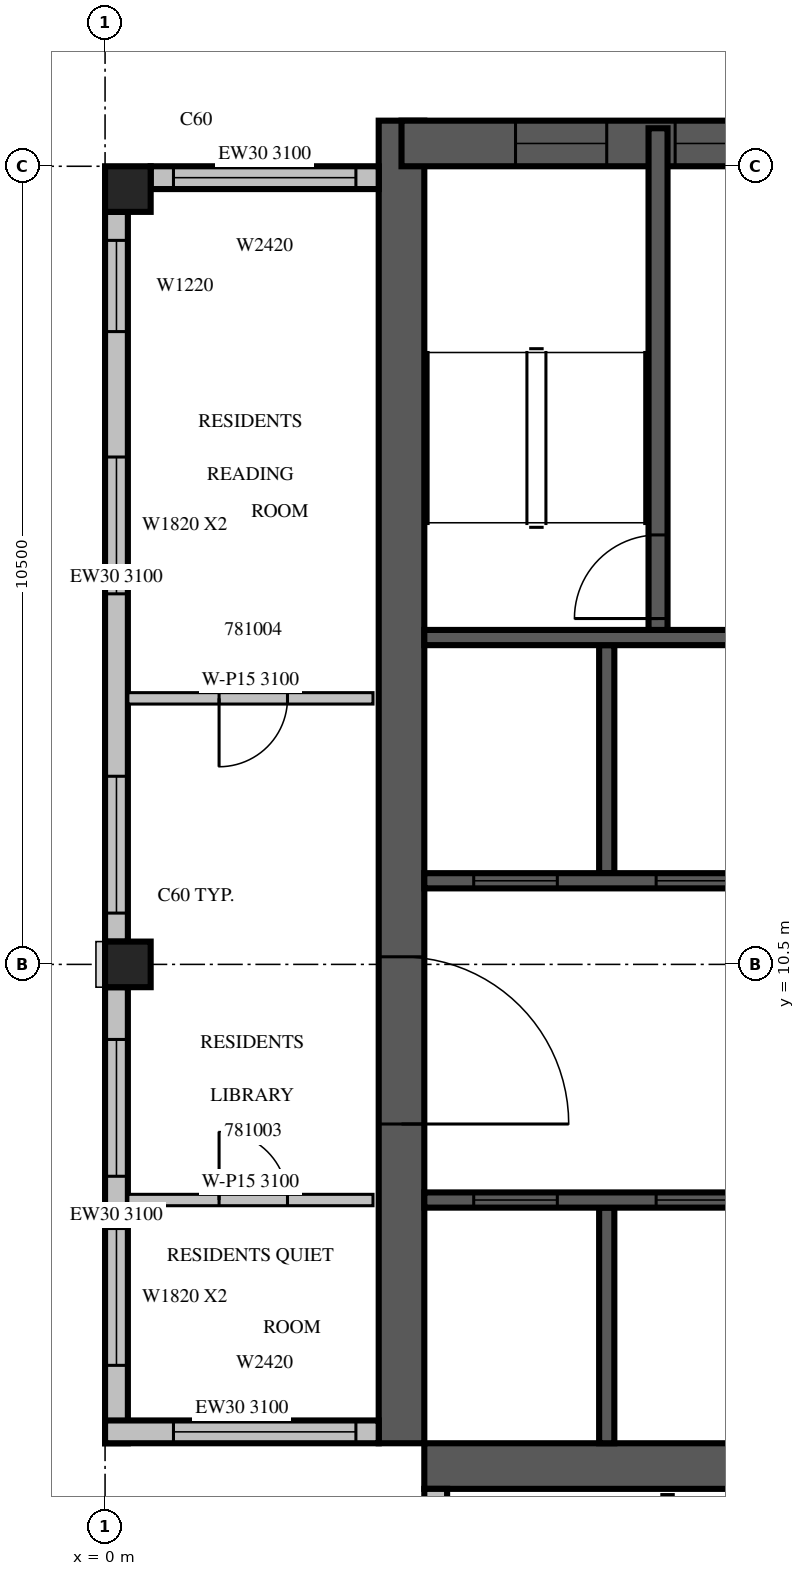
"""IFC4 building model, lengths in metres.
Left out: names, types, materials, properties, quantities, classifications, styles, units other than length and angle.
Written with IfcOpenShell. Run it as: python <this file> out.ifc"""

import sys

from ifc_helpers import new_model, si_unit, direction, frame, frame_2d, origin, origin_2d, place, context, subcontext, project, spatial, rectangle, extrude, source, transform, mapped, element, fill, save


model = new_model("IFC4")
c1 = context("Model", 3, precision=1e-05, world=origin(), true_north=direction((0.0, 1.0)))
c2 = subcontext(c1, "Body", "Model", "MODEL_VIEW")
j1 = project(units=[si_unit("LENGTHUNIT", "METRE"), si_unit("PLANEANGLEUNIT", "RADIAN")], contexts=[c1])
p1 = place(None, origin())
s1 = spatial("IfcSite", under=j1, at=p1, CompositionType="ELEMENT")
p2 = place(p1, origin())
s2 = spatial("IfcBuilding", under=s1, at=p2, CompositionType="ELEMENT")
p3 = place(p2, frame((0.0, 0.0, 344.0)))
s3 = spatial("IfcBuildingStorey", under=s2, at=p3, CompositionType="ELEMENT", Elevation=344.0)
m1 = source(origin(), c2, "Body", "SweptSolid", [
    extrude(rectangle(XDim=0.6, YDim=0.6, at=origin_2d()), origin(), (0.0, 0.0, 1.0), 3.5),
])
for number, where, z_axis, x_axis in (
    (1, (0.3, 10.5, 0.0), (0.0, 0.0, 1.0), (1.0, 0.0, 0.0)),
    (2, (0.3, 20.7, 0.0), (0.0, 0.0, 1.0), (1.0, 0.0, 0.0)),
):
    element("IfcColumn", number, at=place(p3, frame(where, z_axis=z_axis, x_axis=x_axis)), inside=s3, PredefinedType="COLUMN", context=c2, shape_type="MappedRepresentation", body=[
        mapped(m1, transform((0.0, 0.0, 0.0), scale=1.0)),
    ])
m2 = source(origin(), c2, "Body", "SweptSolid", [
    extrude(rectangle(XDim=17.4, YDim=0.6, at=frame_2d((8.7, 0.0))), origin(), (0.0, 0.0, 1.0), 3.5),
])
p4 = place(p3, frame((3.9, 4.2, 0.0), z_axis=(0.0, 0.0, 1.0), x_axis=(0.0, 1.0, 0.0)))
e3 = element("IfcWall", 3, at=p4, inside=s3, PredefinedType="SHEAR", context=c2, shape_type="MappedRepresentation", body=[
    mapped(m2, transform((0.0, 0.0, 0.0), scale=1.0)),
])
m3 = source(origin(), c2, "Body", "SweptSolid", [
    extrude(rectangle(XDim=2.2, YDim=2.1, at=frame_2d((1.1, 1.05))), frame((0.0, 0.31, 0.0), z_axis=(0.0, -1.0, 0.0), x_axis=(1.0, 0.0, 0.0)), (0.0, 0.0, 1.0), 0.62),
])
p5 = place(p4, frame((4.2, 0.0, 0.0)))
e4 = element("IfcOpeningElement", 4, at=p5, cuts=e3, PredefinedType="OPENING", context=c2, shape_type="MappedRepresentation", body=[
    mapped(m3, transform((0.0, 0.0, 0.0), scale=1.0)),
])
p6 = place(p3, frame((4.2, 3.9, 0.0), z_axis=(0.0, 0.0, 1.0), x_axis=(1.0, 0.0, 0.0)))
e5 = element("IfcWall", 5, at=p6, inside=s3, PredefinedType="SHEAR", context=c2, shape_type="MappedRepresentation", body=[
    mapped(m2, transform((0.0, 0.0, 0.0), scale=1.0)),
])
m4 = source(origin(), c2, "Body", "SweptSolid", [
    extrude(rectangle(XDim=0.9, YDim=2.1, at=frame_2d((0.45, 1.05))), frame((0.0, 0.31, 0.0), z_axis=(0.0, -1.0, 0.0), x_axis=(1.0, 0.0, 0.0)), (0.0, 0.0, 1.0), 0.62),
])
p7 = place(p6, frame((12.8, 0.0, 0.0)))
e6 = element("IfcOpeningElement", 6, at=p7, cuts=e5, PredefinedType="OPENING", context=c2, shape_type="MappedRepresentation", body=[
    mapped(m4, transform((0.0, 0.0, 0.0), scale=1.0)),
])
m5 = source(origin(), c2, "Body", "SweptSolid", [
    extrude(rectangle(XDim=6.6, YDim=0.6, at=frame_2d((3.3, 0.0))), origin(), (0.0, 0.0, 1.0), 3.5),
])
p8 = place(p3, frame((3.9, 21.3, 0.0), z_axis=(0.0, 0.0, 1.0), x_axis=(1.0, 0.0, 0.0)))
e7 = element("IfcWall", 7, at=p8, inside=s3, PredefinedType="SHEAR", context=c2, shape_type="MappedRepresentation", body=[
    mapped(m5, transform((0.0, 0.0, 0.0), scale=1.0)),
])
m6 = source(origin(), c2, "Body", "SweptSolid", [
    extrude(rectangle(XDim=1.2, YDim=2.4, at=frame_2d((0.6, 1.2))), frame((0.0, 0.31, 0.0), z_axis=(0.0, -1.0, 0.0), x_axis=(1.0, 0.0, 0.0)), (0.0, 0.0, 1.0), 0.62),
])
p9 = place(p8, frame((1.5, 0.0, 0.6)))
e8 = element("IfcOpeningElement", 8, at=p9, cuts=e7, PredefinedType="OPENING", context=c2, shape_type="MappedRepresentation", body=[
    mapped(m6, transform((0.0, 0.0, 0.0), scale=1.0)),
])
p10 = place(p8, frame((3.6, 0.0, 0.6)))
e9 = element("IfcOpeningElement", 9, at=p10, cuts=e7, PredefinedType="OPENING", context=c2, shape_type="MappedRepresentation", body=[
    mapped(m6, transform((0.0, 0.0, 0.0), scale=1.0)),
])
m7 = source(origin(), c2, "Body", "SweptSolid", [
    extrude(rectangle(XDim=3.0, YDim=0.3, at=frame_2d((1.5, 0.0))), origin(), (0.0, 0.0, 1.0), 3.1),
])
p11 = place(p3, frame((3.6, 20.85, 0.0), z_axis=(0.0, 0.0, 1.0), x_axis=(-1.0, 0.0, 0.0)))
e10 = element("IfcWall", 10, at=p11, inside=s3, PredefinedType="STANDARD", context=c2, shape_type="MappedRepresentation", body=[
    mapped(m7, transform((0.0, 0.0, 0.0), scale=1.0)),
])
m8 = source(origin(), c2, "Body", "SweptSolid", [
    extrude(rectangle(XDim=2.4, YDim=2.0, at=frame_2d((1.2, 1.0))), frame((0.0, 0.16, 0.0), z_axis=(0.0, -1.0, 0.0), x_axis=(1.0, 0.0, 0.0)), (0.0, 0.0, 1.0), 0.32),
])
p12 = place(p11, frame((0.3, 0.0, 0.6)))
e11 = element("IfcOpeningElement", 11, at=p12, cuts=e10, PredefinedType="OPENING", context=c2, shape_type="MappedRepresentation", body=[
    mapped(m8, transform((0.0, 0.0, 0.0), scale=1.0)),
])
m9 = source(origin(), c2, "Body", "SweptSolid", [
    extrude(rectangle(XDim=9.6, YDim=0.3, at=frame_2d((4.8, 0.0))), origin(), (0.0, 0.0, 1.0), 3.1),
])
p13 = place(p3, frame((0.15, 20.4, 0.0), z_axis=(0.0, 0.0, 1.0), x_axis=(0.0, -1.0, 0.0)))
e12 = element("IfcWall", 12, at=p13, inside=s3, PredefinedType="STANDARD", context=c2, shape_type="MappedRepresentation", body=[
    mapped(m9, transform((0.0, 0.0, 0.0), scale=1.0)),
])
m10 = source(origin(), c2, "Body", "SweptSolid", [
    extrude(rectangle(XDim=1.2, YDim=2.0, at=frame_2d((0.6, 1.0))), frame((0.0, 0.16, 0.0), z_axis=(0.0, -1.0, 0.0), x_axis=(1.0, 0.0, 0.0)), (0.0, 0.0, 1.0), 0.32),
])
p14 = place(p13, frame((0.375, 0.0, 0.6)))
e13 = element("IfcOpeningElement", 13, at=p14, cuts=e12, PredefinedType="OPENING", context=c2, shape_type="MappedRepresentation", body=[
    mapped(m10, transform((0.0, 0.0, 0.0), scale=1.0)),
])
m11 = source(origin(), c2, "Body", "SweptSolid", [
    extrude(rectangle(XDim=1.8, YDim=2.0, at=frame_2d((0.9, 1.0))), frame((0.0, 0.16, 0.0), z_axis=(0.0, -1.0, 0.0), x_axis=(1.0, 0.0, 0.0)), (0.0, 0.0, 1.0), 0.32),
])
p15 = place(p13, frame((3.225, 0.0, 0.6)))
e14 = element("IfcOpeningElement", 14, at=p15, cuts=e12, PredefinedType="OPENING", context=c2, shape_type="MappedRepresentation", body=[
    mapped(m11, transform((0.0, 0.0, 0.0), scale=1.0)),
])
p16 = place(p13, frame((7.425, 0.0, 0.6)))
e15 = element("IfcOpeningElement", 15, at=p16, cuts=e12, PredefinedType="OPENING", context=c2, shape_type="MappedRepresentation", body=[
    mapped(m11, transform((0.0, 0.0, 0.0), scale=1.0)),
])
m12 = source(origin(), c2, "Body", "SweptSolid", [
    extrude(rectangle(XDim=6.0, YDim=0.3, at=frame_2d((3.0, 0.0))), origin(), (0.0, 0.0, 1.0), 3.1),
])
p17 = place(p3, frame((0.15, 10.2, 0.0), z_axis=(0.0, 0.0, 1.0), x_axis=(0.0, -1.0, 0.0)))
e16 = element("IfcWall", 16, at=p17, inside=s3, PredefinedType="STANDARD", context=c2, shape_type="MappedRepresentation", body=[
    mapped(m12, transform((0.0, 0.0, 0.0), scale=1.0)),
])
p18 = place(p17, frame((3.175, 0.0, 0.6)))
e17 = element("IfcOpeningElement", 17, at=p18, cuts=e16, PredefinedType="OPENING", context=c2, shape_type="MappedRepresentation", body=[
    mapped(m11, transform((0.0, 0.0, 0.0), scale=1.0)),
])
p19 = place(p17, frame((0.688, 0.0, 0.6)))
e18 = element("IfcOpeningElement", 18, at=p19, cuts=e16, PredefinedType="OPENING", context=c2, shape_type="MappedRepresentation", body=[
    mapped(m11, transform((0.0, 0.0, 0.0), scale=1.0)),
])
m13 = source(origin(), c2, "Body", "SweptSolid", [
    extrude(rectangle(XDim=3.6, YDim=0.3, at=frame_2d((1.8, 0.0))), origin(), (0.0, 0.0, 1.0), 3.1),
])
p20 = place(p3, frame((0.0, 4.35, 0.0), z_axis=(0.0, 0.0, 1.0), x_axis=(1.0, 0.0, 0.0)))
e19 = element("IfcWall", 19, at=p20, inside=s3, PredefinedType="STANDARD", context=c2, shape_type="MappedRepresentation", body=[
    mapped(m13, transform((0.0, 0.0, 0.0), scale=1.0)),
])
p21 = place(p20, frame((0.9, 0.0, 0.6)))
e20 = element("IfcOpeningElement", 20, at=p21, cuts=e19, PredefinedType="OPENING", context=c2, shape_type="MappedRepresentation", body=[
    mapped(m8, transform((0.0, 0.0, 0.0), scale=1.0)),
])
p22 = place(p3, frame((4.35, 3.6, 0.0), z_axis=(0.0, 0.0, 1.0), x_axis=(0.0, -1.0, 0.0)))
e21 = element("IfcWall", 21, at=p22, inside=s3, PredefinedType="STANDARD", context=c2, shape_type="MappedRepresentation", body=[
    mapped(m13, transform((0.0, 0.0, 0.0), scale=1.0)),
])
p23 = place(p22, frame((0.3, 0.0, 0.6)))
e22 = element("IfcOpeningElement", 22, at=p23, cuts=e21, PredefinedType="OPENING", context=c2, shape_type="MappedRepresentation", body=[
    mapped(m8, transform((0.0, 0.0, 0.0), scale=1.0)),
])
m14 = source(origin(), c2, "Body", "SweptSolid", [
    extrude(rectangle(XDim=3.1, YDim=0.2, at=frame_2d((1.55, 0.0))), origin(), (0.0, 0.0, 1.0), 3.5),
])
p24 = place(p3, frame((6.6, 4.2, 0.0), z_axis=(0.0, 0.0, 1.0), x_axis=(0.0, 1.0, 0.0)))
e23 = element("IfcWall", 23, at=p24, inside=s3, PredefinedType="SOLIDWALL", context=c2, shape_type="MappedRepresentation", body=[
    mapped(m14, transform((0.0, 0.0, 0.0), scale=1.0)),
])
m15 = source(origin(), c2, "Body", "SweptSolid", [
    extrude(rectangle(XDim=3.0, YDim=0.2, at=frame_2d((1.5, 0.0))), origin(), (0.0, 0.0, 1.0), 3.5),
])
p25 = place(p3, frame((6.6, 11.7, 0.0), z_axis=(0.0, 0.0, 1.0), x_axis=(0.0, 1.0, 0.0)))
e24 = element("IfcWall", 24, at=p25, inside=s3, PredefinedType="SOLIDWALL", context=c2, shape_type="MappedRepresentation", body=[
    mapped(m15, transform((0.0, 0.0, 0.0), scale=1.0)),
])
m16 = source(origin(), c2, "Body", "SweptSolid", [
    extrude(rectangle(XDim=9.6, YDim=0.2, at=frame_2d((4.8, 0.0))), origin(), (0.0, 0.0, 1.0), 3.5),
])
p26 = place(p3, frame((4.2, 7.4, 0.0), z_axis=(0.0, 0.0, 1.0), x_axis=(1.0, 0.0, 0.0)))
e25 = element("IfcWall", 25, at=p26, inside=s3, PredefinedType="SOLIDWALL", context=c2, shape_type="MappedRepresentation", body=[
    mapped(m16, transform((0.0, 0.0, 0.0), scale=1.0)),
])
m17 = source(origin(), c2, "Body", "SweptSolid", [
    extrude(rectangle(XDim=1.1, YDim=2.1, at=frame_2d((0.55, 1.05))), frame((0.0, 0.11, 0.0), z_axis=(0.0, -1.0, 0.0), x_axis=(1.0, 0.0, 0.0)), (0.0, 0.0, 1.0), 0.22),
])
p27 = place(p26, frame((0.65, 0.0, 0.0)))
e26 = element("IfcOpeningElement", 26, at=p27, cuts=e25, PredefinedType="OPENING", context=c2, shape_type="MappedRepresentation", body=[
    mapped(m17, transform((0.0, 0.0, 0.0), scale=1.0)),
])
p28 = place(p26, frame((3.05, 0.0, 0.0)))
e27 = element("IfcOpeningElement", 27, at=p28, cuts=e25, PredefinedType="OPENING", context=c2, shape_type="MappedRepresentation", body=[
    mapped(m17, transform((0.0, 0.0, 0.0), scale=1.0)),
])
p29 = place(p26, frame((5.45, 0.0, 0.0)))
e28 = element("IfcOpeningElement", 28, at=p29, cuts=e25, PredefinedType="OPENING", context=c2, shape_type="MappedRepresentation", body=[
    mapped(m17, transform((0.0, 0.0, 0.0), scale=1.0)),
])
p30 = place(p26, frame((7.85, 0.0, 0.0)))
e29 = element("IfcOpeningElement", 29, at=p30, cuts=e25, PredefinedType="OPENING", context=c2, shape_type="MappedRepresentation", body=[
    mapped(m17, transform((0.0, 0.0, 0.0), scale=1.0)),
])
m18 = source(origin(), c2, "Body", "SweptSolid", [
    extrude(rectangle(XDim=4.8, YDim=0.2, at=frame_2d((2.4, 0.0))), origin(), (0.0, 0.0, 1.0), 3.5),
])
p31 = place(p3, frame((4.2, 11.6, 0.0), z_axis=(0.0, 0.0, 1.0), x_axis=(1.0, 0.0, 0.0)))
e30 = element("IfcWall", 30, at=p31, inside=s3, PredefinedType="SOLIDWALL", context=c2, shape_type="MappedRepresentation", body=[
    mapped(m18, transform((0.0, 0.0, 0.0), scale=1.0)),
])
p32 = place(p31, frame((0.65, 0.0, 0.0)))
e31 = element("IfcOpeningElement", 31, at=p32, cuts=e30, PredefinedType="OPENING", context=c2, shape_type="MappedRepresentation", body=[
    mapped(m17, transform((0.0, 0.0, 0.0), scale=1.0)),
])
p33 = place(p31, frame((3.05, 0.0, 0.0)))
e32 = element("IfcOpeningElement", 32, at=p33, cuts=e30, PredefinedType="OPENING", context=c2, shape_type="MappedRepresentation", body=[
    mapped(m17, transform((0.0, 0.0, 0.0), scale=1.0)),
])
p34 = place(p3, frame((4.2, 14.8, 0.0), z_axis=(0.0, 0.0, 1.0), x_axis=(1.0, 0.0, 0.0)))
e33 = element("IfcWall", 33, at=p34, inside=s3, PredefinedType="SOLIDWALL", context=c2, shape_type="MappedRepresentation", body=[
    mapped(m18, transform((0.0, 0.0, 0.0), scale=1.0)),
])
m19 = source(origin(), c2, "Body", "SweptSolid", [
    extrude(rectangle(XDim=6.6, YDim=0.25, at=frame_2d((3.3, 0.0))), origin(), (0.0, 0.0, 1.0), 3.1),
])
p35 = place(p3, frame((7.275, 14.9, 0.0), z_axis=(0.0, 0.0, 1.0), x_axis=(0.0, 1.0, 0.0)))
e34 = element("IfcWall", 34, at=p35, inside=s3, PredefinedType="SOLIDWALL", context=c2, shape_type="MappedRepresentation", body=[
    mapped(m19, transform((0.0, 0.0, 0.0), scale=1.0)),
])
m20 = source(origin(), c2, "Body", "SweptSolid", [
    extrude(rectangle(XDim=1.1, YDim=2.1, at=frame_2d((0.55, 1.05))), frame((0.0, 0.135, 0.0), z_axis=(0.0, -1.0, 0.0), x_axis=(1.0, 0.0, 0.0)), (0.0, 0.0, 1.0), 0.27),
])
p36 = place(p35, frame((0.15, 0.0, 0.0)))
e35 = element("IfcOpeningElement", 35, at=p36, cuts=e34, PredefinedType="OPENING", context=c2, shape_type="MappedRepresentation", body=[
    mapped(m20, transform((0.0, 0.0, 0.0), scale=1.0)),
])
m21 = source(origin(), c2, "Body", "SweptSolid", [
    extrude(rectangle(XDim=3.225, YDim=0.15, at=frame_2d((1.613, 0.0))), origin(), (0.0, 0.0, 1.0), 3.1),
])
p37 = place(p3, frame((7.4, 3.525, 0.0), z_axis=(0.0, 0.0, 1.0), x_axis=(0.0, -1.0, 0.0)))
e36 = element("IfcWall", 36, at=p37, inside=s3, PredefinedType="PARTITIONING", context=c2, shape_type="MappedRepresentation", body=[
    mapped(m21, transform((0.0, 0.0, 0.0), scale=1.0)),
])
m22 = source(origin(), c2, "Body", "SweptSolid", [
    extrude(rectangle(XDim=0.9, YDim=2.1, at=frame_2d((0.45, 1.05))), frame((0.0, 0.085, 0.0), z_axis=(0.0, -1.0, 0.0), x_axis=(1.0, 0.0, 0.0)), (0.0, 0.0, 1.0), 0.17),
])
p38 = place(p37, frame((1.125, 0.0, 0.0)))
e37 = element("IfcOpeningElement", 37, at=p38, cuts=e36, PredefinedType="OPENING", context=c2, shape_type="MappedRepresentation", body=[
    mapped(m22, transform((0.0, 0.0, 0.0), scale=1.0)),
])
p39 = place(p3, frame((0.3, 7.4, 0.0), z_axis=(0.0, 0.0, 1.0), x_axis=(1.0, 0.0, 0.0)))
e38 = element("IfcWall", 38, at=p39, inside=s3, PredefinedType="PARTITIONING", context=c2, shape_type="MappedRepresentation", body=[
    mapped(m21, transform((0.0, 0.0, 0.0), scale=1.0)),
])
p40 = place(p39, frame((1.2, 0.0, 0.0)))
e39 = element("IfcOpeningElement", 39, at=p40, cuts=e38, PredefinedType="OPENING", context=c2, shape_type="MappedRepresentation", body=[
    mapped(m22, transform((0.0, 0.0, 0.0), scale=1.0)),
])
p41 = place(p3, frame((0.3, 14.0, 0.0), z_axis=(0.0, 0.0, 1.0), x_axis=(1.0, 0.0, 0.0)))
e40 = element("IfcWall", 40, at=p41, inside=s3, PredefinedType="PARTITIONING", context=c2, shape_type="MappedRepresentation", body=[
    mapped(m21, transform((0.0, 0.0, 0.0), scale=1.0)),
])
p42 = place(p41, frame((1.2, 0.0, 0.0)))
e41 = element("IfcOpeningElement", 41, at=p42, cuts=e40, PredefinedType="OPENING", context=c2, shape_type="MappedRepresentation", body=[
    mapped(m22, transform((0.0, 0.0, 0.0), scale=1.0)),
])
m23 = source(origin(), c2, "Body", "SweptSolid", [
    extrude(rectangle(XDim=2.4, YDim=2.0, at=frame_2d((1.2, 1.0))), frame((0.0, 0.03, 0.0), z_axis=(0.0, -1.0, 0.0), x_axis=(1.0, 0.0, 0.0)), (0.0, 0.0, 1.0), 0.06),
])
p43 = place(p12, origin())
e42 = element("IfcWindow", 42, at=p43, inside=s3, PartitioningType="SINGLE_PANEL", PredefinedType="WINDOW", context=c2, shape_type="MappedRepresentation", body=[
    mapped(m23, transform((0.0, 0.0, 0.0), scale=1.0)),
])
fill(e11, e42)
m24 = source(origin(), c2, "Body", "SweptSolid", [
    extrude(rectangle(XDim=1.2, YDim=2.0, at=frame_2d((0.6, 1.0))), frame((0.0, 0.03, 0.0), z_axis=(0.0, -1.0, 0.0), x_axis=(1.0, 0.0, 0.0)), (0.0, 0.0, 1.0), 0.06),
])
p44 = place(p14, origin())
e43 = element("IfcWindow", 43, at=p44, inside=s3, PartitioningType="SINGLE_PANEL", PredefinedType="WINDOW", context=c2, shape_type="MappedRepresentation", body=[
    mapped(m24, transform((0.0, 0.0, 0.0), scale=1.0)),
])
fill(e13, e43)
m25 = source(origin(), c2, "Body", "SweptSolid", [
    extrude(rectangle(XDim=1.8, YDim=2.0, at=frame_2d((0.9, 1.0))), frame((0.0, 0.03, 0.0), z_axis=(0.0, -1.0, 0.0), x_axis=(1.0, 0.0, 0.0)), (0.0, 0.0, 1.0), 0.06),
])
p45 = place(p15, origin())
e44 = element("IfcWindow", 44, at=p45, inside=s3, PartitioningType="SINGLE_PANEL", PredefinedType="WINDOW", context=c2, shape_type="MappedRepresentation", body=[
    mapped(m25, transform((0.0, 0.0, 0.0), scale=1.0)),
])
fill(e14, e44)
p46 = place(p16, origin())
e45 = element("IfcWindow", 45, at=p46, inside=s3, PartitioningType="SINGLE_PANEL", PredefinedType="WINDOW", context=c2, shape_type="MappedRepresentation", body=[
    mapped(m25, transform((0.0, 0.0, 0.0), scale=1.0)),
])
fill(e15, e45)
p47 = place(p18, origin())
e46 = element("IfcWindow", 46, at=p47, inside=s3, PartitioningType="SINGLE_PANEL", PredefinedType="WINDOW", context=c2, shape_type="MappedRepresentation", body=[
    mapped(m25, transform((0.0, 0.0, 0.0), scale=1.0)),
])
fill(e17, e46)
p48 = place(p19, origin())
e47 = element("IfcWindow", 47, at=p48, inside=s3, PartitioningType="SINGLE_PANEL", PredefinedType="WINDOW", context=c2, shape_type="MappedRepresentation", body=[
    mapped(m25, transform((0.0, 0.0, 0.0), scale=1.0)),
])
fill(e18, e47)
p49 = place(p21, origin())
e48 = element("IfcWindow", 48, at=p49, inside=s3, PartitioningType="SINGLE_PANEL", PredefinedType="WINDOW", context=c2, shape_type="MappedRepresentation", body=[
    mapped(m23, transform((0.0, 0.0, 0.0), scale=1.0)),
])
fill(e20, e48)
m26 = source(origin(), c2, "Body", "SweptSolid", [
    extrude(rectangle(XDim=1.1, YDim=2.1, at=frame_2d((0.55, 1.05))), frame((0.0, 0.025, 0.0), z_axis=(0.0, -1.0, 0.0), x_axis=(1.0, 0.0, 0.0)), (0.0, 0.0, 1.0), 0.05),
])
p50 = place(p27, origin())
e49 = element("IfcDoor", 49, at=p50, inside=s3, OperationType="SLIDING_TO_LEFT", PredefinedType="DOOR", context=c2, shape_type="MappedRepresentation", body=[
    mapped(m26, transform((0.0, 0.0, 0.0), scale=1.0)),
])
fill(e26, e49)
p51 = place(p28, origin())
e50 = element("IfcDoor", 50, at=p51, inside=s3, OperationType="SLIDING_TO_LEFT", PredefinedType="DOOR", context=c2, shape_type="MappedRepresentation", body=[
    mapped(m26, transform((0.0, 0.0, 0.0), scale=1.0)),
])
fill(e27, e50)
p52 = place(p32, origin())
e51 = element("IfcDoor", 51, at=p52, inside=s3, OperationType="SLIDING_TO_LEFT", PredefinedType="DOOR", context=c2, shape_type="MappedRepresentation", body=[
    mapped(m26, transform((0.0, 0.0, 0.0), scale=1.0)),
])
fill(e31, e51)
p53 = place(p33, origin())
e52 = element("IfcDoor", 52, at=p53, inside=s3, OperationType="SLIDING_TO_LEFT", PredefinedType="DOOR", context=c2, shape_type="MappedRepresentation", body=[
    mapped(m26, transform((0.0, 0.0, 0.0), scale=1.0)),
])
fill(e32, e52)
p54 = place(p36, origin())
e53 = element("IfcDoor", 53, at=p54, inside=s3, OperationType="SINGLE_SWING_LEFT", PredefinedType="DOOR", context=c2, shape_type="MappedRepresentation", body=[
    mapped(m26, transform((0.0, 0.0, 0.0), scale=1.0)),
])
fill(e35, e53)
m27 = source(origin(), c2, "Body", "SweptSolid", [
    extrude(rectangle(XDim=2.2, YDim=2.1, at=frame_2d((1.1, 1.05))), frame((0.0, 0.025, 0.0), z_axis=(0.0, -1.0, 0.0), x_axis=(1.0, 0.0, 0.0)), (0.0, 0.0, 1.0), 0.05),
])
p55 = place(p5, origin())
e54 = element("IfcDoor", 54, at=p55, inside=s3, OperationType="DOUBLE_DOOR_SINGLE_SWING", PredefinedType="DOOR", context=c2, shape_type="MappedRepresentation", body=[
    mapped(m27, transform((0.0, 0.0, 0.0), scale=1.0)),
])
fill(e4, e54)
m28 = source(origin(), c2, "Body", "SweptSolid", [
    extrude(rectangle(XDim=1.2, YDim=2.4, at=frame_2d((0.6, 1.2))), frame((0.0, 0.03, 0.0), z_axis=(0.0, -1.0, 0.0), x_axis=(1.0, 0.0, 0.0)), (0.0, 0.0, 1.0), 0.06),
])
p56 = place(p9, origin())
e55 = element("IfcWindow", 55, at=p56, inside=s3, PartitioningType="SINGLE_PANEL", PredefinedType="WINDOW", context=c2, shape_type="MappedRepresentation", body=[
    mapped(m28, transform((0.0, 0.0, 0.0), scale=1.0)),
])
fill(e8, e55)
p57 = place(p10, origin())
e56 = element("IfcWindow", 56, at=p57, inside=s3, PartitioningType="SINGLE_PANEL", PredefinedType="WINDOW", context=c2, shape_type="MappedRepresentation", body=[
    mapped(m28, transform((0.0, 0.0, 0.0), scale=1.0)),
])
fill(e9, e56)
m29 = source(origin(), c2, "Body", "SweptSolid", [
    extrude(rectangle(XDim=0.9, YDim=2.1, at=frame_2d((0.45, 1.05))), frame((0.0, 0.025, 0.0), z_axis=(0.0, -1.0, 0.0), x_axis=(1.0, 0.0, 0.0)), (0.0, 0.0, 1.0), 0.05),
])
p58 = place(p40, origin())
e57 = element("IfcDoor", 57, at=p58, inside=s3, OperationType="SINGLE_SWING_LEFT", PredefinedType="DOOR", context=c2, shape_type="MappedRepresentation", body=[
    mapped(m29, transform((0.0, 0.0, 0.0), scale=1.0)),
])
fill(e39, e57)
p59 = place(p42, origin())
e58 = element("IfcDoor", 58, at=p59, inside=s3, OperationType="SINGLE_SWING_RIGHT", PredefinedType="DOOR", context=c2, shape_type="MappedRepresentation", body=[
    mapped(m29, transform((0.0, 0.0, 0.0), scale=1.0)),
])
fill(e41, e58)
save(model, sys.argv[1])
